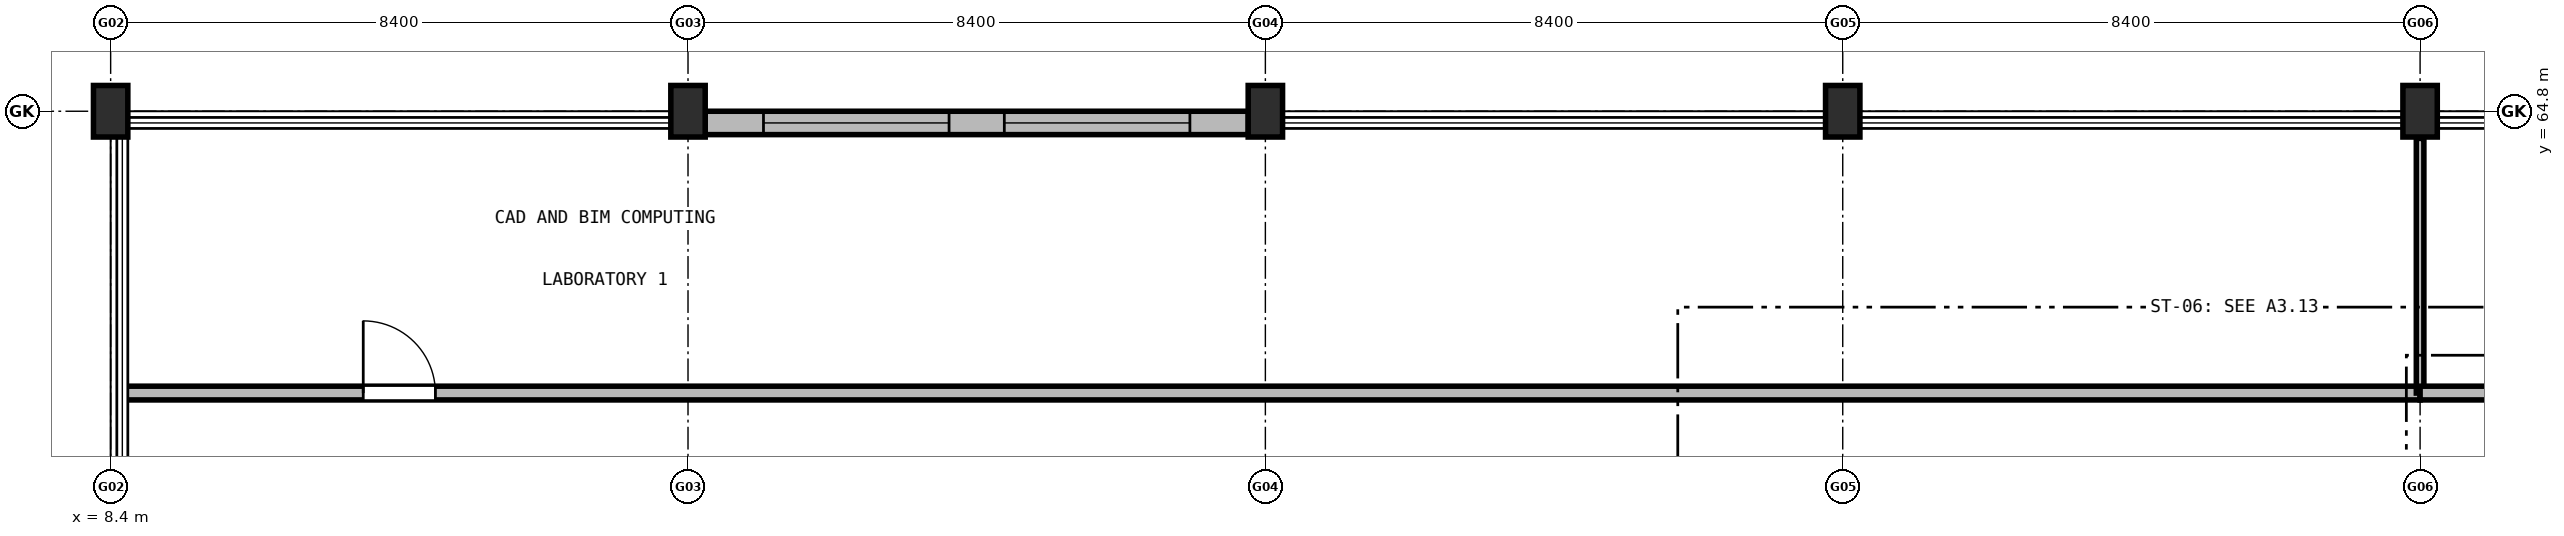
"""IFC4 building model, lengths in metres.
Left out: names, types, materials, properties, quantities, classifications, styles, units other than length and angle.
Written with IfcOpenShell. Run it as: python <this file> out.ifc"""

import sys

from ifc_helpers import new_model, si_unit, direction, frame, frame_2d, origin, origin_2d, place, context, subcontext, project, spatial, rectangle, extrude, element, fill, save


model = new_model("IFC4")
c1 = context("Model", 3, precision=1e-05, world=origin(), true_north=direction((0.0, 1.0)))
c2 = subcontext(c1, "Body", "Model", "MODEL_VIEW")
j1 = project(units=[si_unit("LENGTHUNIT", "METRE"), si_unit("PLANEANGLEUNIT", "RADIAN")], contexts=[c1])
p1 = place(None, origin())
s1 = spatial("IfcSite", under=j1, at=p1, CompositionType="ELEMENT")
p2 = place(p1, origin())
s2 = spatial("IfcBuilding", under=s1, at=p2, CompositionType="ELEMENT")
p3 = place(p2, frame((0.0, 0.0, 5.1)))
s3 = spatial("IfcBuildingStorey", under=s2, at=p3, CompositionType="ELEMENT", Elevation=5.1)
for number, where, z_axis, x_axis in (
    (1, (8.4, 64.8, 0.0), (0.0, 0.0, 1.0), (1.0, 0.0, 0.0)),
    (2, (16.8, 64.8, 0.0), (0.0, 0.0, 1.0), (1.0, 0.0, 0.0)),
    (3, (25.2, 64.8, 0.0), (0.0, 0.0, 1.0), (1.0, 0.0, 0.0)),
    (4, (33.6, 64.8, 0.0), (0.0, 0.0, 1.0), (1.0, 0.0, 0.0)),
    (5, (42.0, 64.8, 0.0), (0.0, 0.0, 1.0), (1.0, 0.0, 0.0)),
):
    element("IfcColumn", number, at=place(p3, frame(where, z_axis=z_axis, x_axis=x_axis)), inside=s3, PredefinedType="COLUMN", context=c2, shape_type="SweptSolid", body=[
        extrude(rectangle(XDim=0.5, YDim=0.75, at=origin_2d()), origin(), (0.0, 0.0, 1.0), 4.2),
    ])
p4 = place(p3, frame((17.048, 64.63, 0.0), z_axis=(0.0, 0.0, 1.0), x_axis=(1.0, 0.0, 0.0)))
e6 = element("IfcWall", 6, at=p4, inside=s3, PredefinedType="SOLIDWALL", context=c2, shape_type="SweptSolid", body=[
    extrude(rectangle(XDim=7.904, YDim=0.34, at=frame_2d((3.952, 0.0))), origin(), (0.0, 0.0, 1.0), 3.11),
])
p5 = place(p4, frame((0.85, 0.0, 0.95)))
e7 = element("IfcOpeningElement", 7, at=p5, cuts=e6, PredefinedType="OPENING", context=c2, shape_type="SweptSolid", body=[
    extrude(rectangle(XDim=2.7, YDim=1.9, at=frame_2d((1.35, 0.95))), frame((0.0, 0.18, 0.0), z_axis=(0.0, -1.0, 0.0), x_axis=(1.0, 0.0, 0.0)), (0.0, 0.0, 1.0), 0.36),
])
p6 = place(p4, frame((4.354, 0.0, 0.95)))
e8 = element("IfcOpeningElement", 8, at=p6, cuts=e6, PredefinedType="OPENING", context=c2, shape_type="SweptSolid", body=[
    extrude(rectangle(XDim=2.7, YDim=1.9, at=frame_2d((1.35, 0.95))), frame((0.0, 0.18, 0.0), z_axis=(0.0, -1.0, 0.0), x_axis=(1.0, 0.0, 0.0)), (0.0, 0.0, 1.0), 0.36),
])
p7 = place(p3, frame((8.62, 60.7, 0.0), z_axis=(0.0, 0.0, 1.0), x_axis=(1.0, 0.0, 0.0)))
e9 = element("IfcWall", 9, at=p7, inside=s3, PredefinedType="SOLIDWALL", context=c2, shape_type="SweptSolid", body=[
    extrude(rectangle(XDim=33.38, YDim=0.2, at=frame_2d((16.69, 0.0))), origin(), (0.0, 0.0, 1.0), 3.305),
])
p8 = place(p7, frame((3.455, 0.0, 0.0)))
e10 = element("IfcOpeningElement", 10, at=p8, cuts=e9, PredefinedType="OPENING", context=c2, shape_type="SweptSolid", body=[
    extrude(rectangle(XDim=1.05, YDim=2.15, at=frame_2d((0.525, 1.075))), frame((0.0, 0.11, 0.0), z_axis=(0.0, -1.0, 0.0), x_axis=(1.0, 0.0, 0.0)), (0.0, 0.0, 1.0), 0.22),
])
p9 = place(p3, frame((42.0, 60.7, 0.0), z_axis=(0.0, 0.0, 1.0), x_axis=(0.0, 1.0, 0.0)))
e11 = element("IfcWall", 11, at=p9, inside=s3, PredefinedType="PARTITIONING", context=c2, shape_type="SweptSolid", body=[
    extrude(rectangle(XDim=3.705, YDim=0.11, at=frame_2d((1.853, 0.0))), origin(), (0.0, 0.0, 1.0), 3.105),
])
p10 = place(p3, frame((42.0, 60.7, 0.0), z_axis=(0.0, 0.0, 1.0), x_axis=(1.0, 0.0, 0.0)))
e12 = element("IfcWall", 12, at=p10, inside=s3, PredefinedType="SOLIDWALL", context=c2, shape_type="SweptSolid", body=[
    extrude(rectangle(XDim=33.6, YDim=0.2, at=frame_2d((16.8, 0.0))), origin(), (0.0, 0.0, 1.0), 3.305),
])
p11 = place(p10, frame((3.7, 0.0, 0.0)))
e13 = element("IfcOpeningElement", 13, at=p11, cuts=e12, PredefinedType="OPENING", context=c2, shape_type="SweptSolid", body=[
    extrude(rectangle(XDim=1.0, YDim=2.1, at=frame_2d((0.5, 1.05))), frame((0.0, 0.11, 0.0), z_axis=(0.0, -1.0, 0.0), x_axis=(1.0, 0.0, 0.0)), (0.0, 0.0, 1.0), 0.22),
])
p12 = place(p5, origin())
e14 = element("IfcWindow", 14, at=p12, inside=s3, PartitioningType="SINGLE_PANEL", PredefinedType="WINDOW", context=c2, shape_type="SweptSolid", body=[
    extrude(rectangle(XDim=2.7, YDim=1.9, at=frame_2d((1.35, 0.95))), frame((0.0, 0.03, 0.0), z_axis=(0.0, -1.0, 0.0), x_axis=(1.0, 0.0, 0.0)), (0.0, 0.0, 1.0), 0.06),
])
fill(e7, e14)
p13 = place(p6, origin())
e15 = element("IfcWindow", 15, at=p13, inside=s3, PartitioningType="SINGLE_PANEL", PredefinedType="WINDOW", context=c2, shape_type="SweptSolid", body=[
    extrude(rectangle(XDim=2.7, YDim=1.9, at=frame_2d((1.35, 0.95))), frame((0.0, 0.03, 0.0), z_axis=(0.0, -1.0, 0.0), x_axis=(1.0, 0.0, 0.0)), (0.0, 0.0, 1.0), 0.06),
])
fill(e8, e15)
p14 = place(p8, origin())
e16 = element("IfcDoor", 16, at=p14, inside=s3, OperationType="SINGLE_SWING_LEFT", PredefinedType="DOOR", context=c2, shape_type="SweptSolid", body=[
    extrude(rectangle(XDim=1.05, YDim=2.15, at=frame_2d((0.525, 1.075))), frame((0.0, 0.025, 0.0), z_axis=(0.0, -1.0, 0.0), x_axis=(1.0, 0.0, 0.0)), (0.0, 0.0, 1.0), 0.05),
])
fill(e10, e16)
save(model, sys.argv[1])
